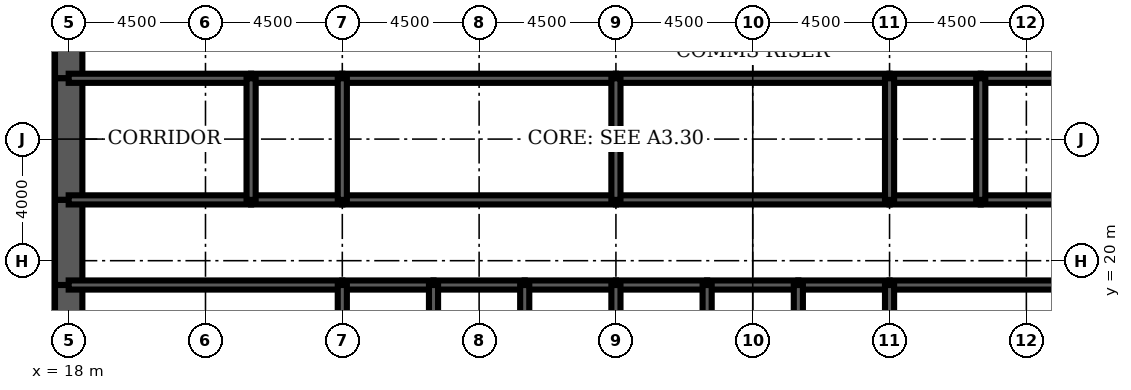
"""IFC4 building model, lengths in metres.
Left out: names, types, materials, properties, quantities, classifications, styles, units other than length and angle.
Written with IfcOpenShell. Run it as: python <this file> out.ifc"""

import sys

from ifc_helpers import new_model, si_unit, direction, frame, frame_2d, origin, place, context, subcontext, project, spatial, rectangle, extrude, element, fill, save


model = new_model("IFC4")
c1 = context("Model", 3, precision=1e-05, world=origin(), true_north=direction((0.0, 1.0)))
c2 = subcontext(c1, "Body", "Model", "MODEL_VIEW")
j1 = project(units=[si_unit("LENGTHUNIT", "METRE"), si_unit("PLANEANGLEUNIT", "RADIAN")], contexts=[c1])
p1 = place(None, origin())
s1 = spatial("IfcSite", under=j1, at=p1, CompositionType="ELEMENT")
p2 = place(p1, origin())
s2 = spatial("IfcBuilding", under=s1, at=p2, CompositionType="ELEMENT")
p3 = place(p2, frame((0.0, 0.0, 129.9)))
s3 = spatial("IfcBuildingStorey", under=s2, at=p3, CompositionType="ELEMENT", Elevation=129.9)
p4 = place(p3, frame((18.0, 28.8, 0.0), z_axis=(0.0, 0.0, 1.0), x_axis=(0.0, -1.0, 0.0)))
e1 = element("IfcWall", 1, at=p4, inside=s3, PredefinedType="SHEAR", context=c2, shape_type="SweptSolid", body=[
    extrude(rectangle(XDim=2.8, YDim=0.9, at=frame_2d((1.4, 0.0))), origin(), (0.0, 0.0, 1.0), 4.2),
])
p5 = place(p4, frame((0.4, 0.0, 0.0)))
e2 = element("IfcOpeningElement", 2, at=p5, cuts=e1, PredefinedType="OPENING", context=c2, shape_type="SweptSolid", body=[
    extrude(rectangle(XDim=1.8, YDim=2.1, at=frame_2d((0.9, 1.05))), frame((0.0, 0.46, 0.0), z_axis=(0.0, -1.0, 0.0), x_axis=(1.0, 0.0, 0.0)), (0.0, 0.0, 1.0), 0.92),
])
p6 = place(p3, frame((18.0, 26.0, 0.0), z_axis=(0.0, 0.0, 1.0), x_axis=(0.0, -1.0, 0.0)))
e3 = element("IfcWall", 3, at=p6, inside=s3, PredefinedType="SHEAR", context=c2, shape_type="SweptSolid", body=[
    extrude(rectangle(XDim=4.0, YDim=0.9, at=frame_2d((2.0, 0.0))), origin(), (0.0, 0.0, 1.0), 4.2),
])
p7 = place(p3, frame((18.0, 22.0, 0.0), z_axis=(0.0, 0.0, 1.0), x_axis=(0.0, -1.0, 0.0)))
e4 = element("IfcWall", 4, at=p7, inside=s3, PredefinedType="SHEAR", context=c2, shape_type="SweptSolid", body=[
    extrude(rectangle(XDim=2.8, YDim=0.9, at=frame_2d((1.4, 0.0))), origin(), (0.0, 0.0, 1.0), 4.2),
])
p8 = place(p7, frame((0.6, 0.0, 0.0)))
e5 = element("IfcOpeningElement", 5, at=p8, cuts=e4, PredefinedType="OPENING", context=c2, shape_type="SweptSolid", body=[
    extrude(rectangle(XDim=1.8, YDim=2.1, at=frame_2d((0.9, 1.05))), frame((0.0, 0.46, 0.0), z_axis=(0.0, -1.0, 0.0), x_axis=(1.0, 0.0, 0.0)), (0.0, 0.0, 1.0), 0.92),
])
p9 = place(p3, frame((18.0, 19.2, 0.0), z_axis=(0.0, 0.0, 1.0), x_axis=(0.0, -1.0, 0.0)))
e6 = element("IfcWall", 6, at=p9, inside=s3, PredefinedType="SHEAR", context=c2, shape_type="SweptSolid", body=[
    extrude(rectangle(XDim=3.2, YDim=0.9, at=frame_2d((1.6, 0.0))), origin(), (0.0, 0.0, 1.0), 4.2),
])
p10 = place(p3, frame((18.0, 19.2, 0.0), z_axis=(0.0, 0.0, 1.0), x_axis=(1.0, 0.0, 0.0)))
e7 = element("IfcWall", 7, at=p10, inside=s3, PredefinedType="SOLIDWALL", context=c2, shape_type="SweptSolid", body=[
    extrude(rectangle(XDim=9.0, YDim=0.3, at=frame_2d((4.5, 0.0))), origin(), (0.0, 0.0, 1.0), 4.2),
])
p11 = place(p10, frame((0.65, 0.0, 0.0)))
e8 = element("IfcOpeningElement", 8, at=p11, cuts=e7, PredefinedType="OPENING", context=c2, shape_type="SweptSolid", body=[
    extrude(rectangle(XDim=1.0, YDim=2.1, at=frame_2d((0.5, 1.05))), frame((0.0, 0.16, 0.0), z_axis=(0.0, -1.0, 0.0), x_axis=(1.0, 0.0, 0.0)), (0.0, 0.0, 1.0), 0.32),
])
p12 = place(p3, frame((27.0, 19.2, 0.0), z_axis=(0.0, 0.0, 1.0), x_axis=(1.0, 0.0, 0.0)))
e9 = element("IfcWall", 9, at=p12, inside=s3, PredefinedType="SOLIDWALL", context=c2, shape_type="SweptSolid", body=[
    extrude(rectangle(XDim=3.0, YDim=0.3, at=frame_2d((1.5, 0.0))), origin(), (0.0, 0.0, 1.0), 4.2),
])
p13 = place(p12, frame((0.95, 0.0, 0.0)))
e10 = element("IfcOpeningElement", 10, at=p13, cuts=e9, PredefinedType="OPENING", context=c2, shape_type="SweptSolid", body=[
    extrude(rectangle(XDim=1.1, YDim=2.2, at=frame_2d((0.55, 1.1))), frame((0.0, 0.16, 0.0), z_axis=(0.0, -1.0, 0.0), x_axis=(1.0, 0.0, 0.0)), (0.0, 0.0, 1.0), 0.32),
])
p14 = place(p3, frame((30.0, 19.2, 0.0), z_axis=(0.0, 0.0, 1.0), x_axis=(1.0, 0.0, 0.0)))
e11 = element("IfcWall", 11, at=p14, inside=s3, PredefinedType="SOLIDWALL", context=c2, shape_type="SweptSolid", body=[
    extrude(rectangle(XDim=3.0, YDim=0.3, at=frame_2d((1.5, 0.0))), origin(), (0.0, 0.0, 1.0), 4.2),
])
p15 = place(p14, frame((0.95, 0.0, 0.0)))
e12 = element("IfcOpeningElement", 12, at=p15, cuts=e11, PredefinedType="OPENING", context=c2, shape_type="SweptSolid", body=[
    extrude(rectangle(XDim=1.1, YDim=2.2, at=frame_2d((0.55, 1.1))), frame((0.0, 0.16, 0.0), z_axis=(0.0, -1.0, 0.0), x_axis=(1.0, 0.0, 0.0)), (0.0, 0.0, 1.0), 0.32),
])
p16 = place(p3, frame((33.0, 19.2, 0.0), z_axis=(0.0, 0.0, 1.0), x_axis=(1.0, 0.0, 0.0)))
e13 = element("IfcWall", 13, at=p16, inside=s3, PredefinedType="SOLIDWALL", context=c2, shape_type="SweptSolid", body=[
    extrude(rectangle(XDim=3.0, YDim=0.3, at=frame_2d((1.5, 0.0))), origin(), (0.0, 0.0, 1.0), 4.2),
])
p17 = place(p16, frame((0.95, 0.0, 0.0)))
e14 = element("IfcOpeningElement", 14, at=p17, cuts=e13, PredefinedType="OPENING", context=c2, shape_type="SweptSolid", body=[
    extrude(rectangle(XDim=1.1, YDim=2.2, at=frame_2d((0.55, 1.1))), frame((0.0, 0.16, 0.0), z_axis=(0.0, -1.0, 0.0), x_axis=(1.0, 0.0, 0.0)), (0.0, 0.0, 1.0), 0.32),
])
p18 = place(p3, frame((36.0, 19.2, 0.0), z_axis=(0.0, 0.0, 1.0), x_axis=(1.0, 0.0, 0.0)))
e15 = element("IfcWall", 15, at=p18, inside=s3, PredefinedType="SOLIDWALL", context=c2, shape_type="SweptSolid", body=[
    extrude(rectangle(XDim=3.0, YDim=0.3, at=frame_2d((1.5, 0.0))), origin(), (0.0, 0.0, 1.0), 4.2),
])
p19 = place(p18, frame((0.95, 0.0, 0.0)))
e16 = element("IfcOpeningElement", 16, at=p19, cuts=e15, PredefinedType="OPENING", context=c2, shape_type="SweptSolid", body=[
    extrude(rectangle(XDim=1.1, YDim=2.2, at=frame_2d((0.55, 1.1))), frame((0.0, 0.16, 0.0), z_axis=(0.0, -1.0, 0.0), x_axis=(1.0, 0.0, 0.0)), (0.0, 0.0, 1.0), 0.32),
])
p20 = place(p3, frame((39.0, 19.2, 0.0), z_axis=(0.0, 0.0, 1.0), x_axis=(1.0, 0.0, 0.0)))
e17 = element("IfcWall", 17, at=p20, inside=s3, PredefinedType="SOLIDWALL", context=c2, shape_type="SweptSolid", body=[
    extrude(rectangle(XDim=3.0, YDim=0.3, at=frame_2d((1.5, 0.0))), origin(), (0.0, 0.0, 1.0), 4.2),
])
p21 = place(p20, frame((1.0, 0.0, 0.0)))
e18 = element("IfcOpeningElement", 18, at=p21, cuts=e17, PredefinedType="OPENING", context=c2, shape_type="SweptSolid", body=[
    extrude(rectangle(XDim=1.0, YDim=2.1, at=frame_2d((0.5, 1.05))), frame((0.0, 0.16, 0.0), z_axis=(0.0, -1.0, 0.0), x_axis=(1.0, 0.0, 0.0)), (0.0, 0.0, 1.0), 0.32),
])
p22 = place(p3, frame((42.0, 19.2, 0.0), z_axis=(0.0, 0.0, 1.0), x_axis=(1.0, 0.0, 0.0)))
e19 = element("IfcWall", 19, at=p22, inside=s3, PredefinedType="SOLIDWALL", context=c2, shape_type="SweptSolid", body=[
    extrude(rectangle(XDim=3.0, YDim=0.3, at=frame_2d((1.5, 0.0))), origin(), (0.0, 0.0, 1.0), 4.2),
])
p23 = place(p3, frame((45.0, 19.2, 0.0), z_axis=(0.0, 0.0, 1.0), x_axis=(1.0, 0.0, 0.0)))
e20 = element("IfcWall", 20, at=p23, inside=s3, PredefinedType="SOLIDWALL", context=c2, shape_type="SweptSolid", body=[
    extrude(rectangle(XDim=9.0, YDim=0.3, at=frame_2d((4.5, 0.0))), origin(), (0.0, 0.0, 1.0), 4.2),
])
p24 = place(p23, frame((7.35, 0.0, 0.0)))
e21 = element("IfcOpeningElement", 21, at=p24, cuts=e20, PredefinedType="OPENING", context=c2, shape_type="SweptSolid", body=[
    extrude(rectangle(XDim=1.0, YDim=2.1, at=frame_2d((0.5, 1.05))), frame((0.0, 0.16, 0.0), z_axis=(0.0, -1.0, 0.0), x_axis=(1.0, 0.0, 0.0)), (0.0, 0.0, 1.0), 0.32),
])
p25 = place(p3, frame((18.0, 22.0, 0.0), z_axis=(0.0, 0.0, 1.0), x_axis=(1.0, 0.0, 0.0)))
e22 = element("IfcWall", 22, at=p25, inside=s3, PredefinedType="SOLIDWALL", context=c2, shape_type="SweptSolid", body=[
    extrude(rectangle(XDim=6.0, YDim=0.3, at=frame_2d((3.0, 0.0))), origin(), (0.0, 0.0, 1.0), 4.2),
])
p26 = place(p25, frame((2.0, 0.0, 0.0)))
e23 = element("IfcOpeningElement", 23, at=p26, cuts=e22, PredefinedType="OPENING", context=c2, shape_type="SweptSolid", body=[
    extrude(rectangle(XDim=1.0, YDim=2.1, at=frame_2d((0.5, 1.05))), frame((0.0, 0.16, 0.0), z_axis=(0.0, -1.0, 0.0), x_axis=(1.0, 0.0, 0.0)), (0.0, 0.0, 1.0), 0.32),
])
p27 = place(p3, frame((24.0, 22.0, 0.0), z_axis=(0.0, 0.0, 1.0), x_axis=(1.0, 0.0, 0.0)))
e24 = element("IfcWall", 24, at=p27, inside=s3, PredefinedType="SOLIDWALL", context=c2, shape_type="SweptSolid", body=[
    extrude(rectangle(XDim=3.0, YDim=0.3, at=frame_2d((1.5, 0.0))), origin(), (0.0, 0.0, 1.0), 4.2),
])
p28 = place(p27, frame((1.0, 0.0, 0.0)))
e25 = element("IfcOpeningElement", 25, at=p28, cuts=e24, PredefinedType="OPENING", context=c2, shape_type="SweptSolid", body=[
    extrude(rectangle(XDim=1.0, YDim=2.1, at=frame_2d((0.5, 1.05))), frame((0.0, 0.16, 0.0), z_axis=(0.0, -1.0, 0.0), x_axis=(1.0, 0.0, 0.0)), (0.0, 0.0, 1.0), 0.32),
])
p29 = place(p3, frame((27.0, 22.0, 0.0), z_axis=(0.0, 0.0, 1.0), x_axis=(1.0, 0.0, 0.0)))
e26 = element("IfcWall", 26, at=p29, inside=s3, PredefinedType="SOLIDWALL", context=c2, shape_type="SweptSolid", body=[
    extrude(rectangle(XDim=9.0, YDim=0.3, at=frame_2d((4.5, 0.0))), origin(), (0.0, 0.0, 1.0), 4.2),
])
p30 = place(p29, frame((4.0, 0.0, 0.0)))
e27 = element("IfcOpeningElement", 27, at=p30, cuts=e26, PredefinedType="OPENING", context=c2, shape_type="SweptSolid", body=[
    extrude(rectangle(XDim=1.0, YDim=2.1, at=frame_2d((0.5, 1.05))), frame((0.0, 0.16, 0.0), z_axis=(0.0, -1.0, 0.0), x_axis=(1.0, 0.0, 0.0)), (0.0, 0.0, 1.0), 0.32),
])
p31 = place(p3, frame((36.0, 22.0, 0.0), z_axis=(0.0, 0.0, 1.0), x_axis=(1.0, 0.0, 0.0)))
e28 = element("IfcWall", 28, at=p31, inside=s3, PredefinedType="SOLIDWALL", context=c2, shape_type="SweptSolid", body=[
    extrude(rectangle(XDim=9.0, YDim=0.3, at=frame_2d((4.5, 0.0))), origin(), (0.0, 0.0, 1.0), 4.2),
])
p32 = place(p31, frame((4.0, 0.0, 0.0)))
e29 = element("IfcOpeningElement", 29, at=p32, cuts=e28, PredefinedType="OPENING", context=c2, shape_type="SweptSolid", body=[
    extrude(rectangle(XDim=1.0, YDim=2.1, at=frame_2d((0.5, 1.05))), frame((0.0, 0.16, 0.0), z_axis=(0.0, -1.0, 0.0), x_axis=(1.0, 0.0, 0.0)), (0.0, 0.0, 1.0), 0.32),
])
p33 = place(p3, frame((45.0, 22.0, 0.0), z_axis=(0.0, 0.0, 1.0), x_axis=(1.0, 0.0, 0.0)))
e30 = element("IfcWall", 30, at=p33, inside=s3, PredefinedType="SOLIDWALL", context=c2, shape_type="SweptSolid", body=[
    extrude(rectangle(XDim=3.0, YDim=0.3, at=frame_2d((1.5, 0.0))), origin(), (0.0, 0.0, 1.0), 4.2),
])
p34 = place(p33, frame((1.0, 0.0, 0.0)))
e31 = element("IfcOpeningElement", 31, at=p34, cuts=e30, PredefinedType="OPENING", context=c2, shape_type="SweptSolid", body=[
    extrude(rectangle(XDim=1.0, YDim=2.1, at=frame_2d((0.5, 1.05))), frame((0.0, 0.16, 0.0), z_axis=(0.0, -1.0, 0.0), x_axis=(1.0, 0.0, 0.0)), (0.0, 0.0, 1.0), 0.32),
])
p35 = place(p3, frame((48.0, 22.0, 0.0), z_axis=(0.0, 0.0, 1.0), x_axis=(1.0, 0.0, 0.0)))
e32 = element("IfcWall", 32, at=p35, inside=s3, PredefinedType="SOLIDWALL", context=c2, shape_type="SweptSolid", body=[
    extrude(rectangle(XDim=6.0, YDim=0.3, at=frame_2d((3.0, 0.0))), origin(), (0.0, 0.0, 1.0), 4.2),
])
p36 = place(p35, frame((2.0, 0.0, 0.0)))
e33 = element("IfcOpeningElement", 33, at=p36, cuts=e32, PredefinedType="OPENING", context=c2, shape_type="SweptSolid", body=[
    extrude(rectangle(XDim=1.0, YDim=2.1, at=frame_2d((0.5, 1.05))), frame((0.0, 0.16, 0.0), z_axis=(0.0, -1.0, 0.0), x_axis=(1.0, 0.0, 0.0)), (0.0, 0.0, 1.0), 0.32),
])
p37 = place(p35, frame((4.15, 0.0, 0.0)))
e34 = element("IfcOpeningElement", 34, at=p37, cuts=e32, PredefinedType="OPENING", context=c2, shape_type="SweptSolid", body=[
    extrude(rectangle(XDim=1.0, YDim=2.1, at=frame_2d((0.5, 1.05))), frame((0.0, 0.16, 0.0), z_axis=(0.0, -1.0, 0.0), x_axis=(1.0, 0.0, 0.0)), (0.0, 0.0, 1.0), 0.32),
])
p38 = place(p3, frame((18.0, 26.0, 0.0), z_axis=(0.0, 0.0, 1.0), x_axis=(1.0, 0.0, 0.0)))
e35 = element("IfcWall", 35, at=p38, inside=s3, PredefinedType="SOLIDWALL", context=c2, shape_type="SweptSolid", body=[
    extrude(rectangle(XDim=6.0, YDim=0.3, at=frame_2d((3.0, 0.0))), origin(), (0.0, 0.0, 1.0), 4.2),
])
p39 = place(p3, frame((24.0, 26.0, 0.0), z_axis=(0.0, 0.0, 1.0), x_axis=(1.0, 0.0, 0.0)))
e36 = element("IfcWall", 36, at=p39, inside=s3, PredefinedType="SOLIDWALL", context=c2, shape_type="SweptSolid", body=[
    extrude(rectangle(XDim=3.0, YDim=0.3, at=frame_2d((1.5, 0.0))), origin(), (0.0, 0.0, 1.0), 4.2),
])
for number, where, z_axis, x_axis in (
    (37, (27.0, 26.0, 0.0), (0.0, 0.0, 1.0), (1.0, 0.0, 0.0)),
    (38, (36.0, 26.0, 0.0), (0.0, 0.0, 1.0), (1.0, 0.0, 0.0)),
):
    element("IfcWall", number, at=place(p3, frame(where, z_axis=z_axis, x_axis=x_axis)), inside=s3, PredefinedType="SOLIDWALL", context=c2, shape_type="SweptSolid", body=[
        extrude(rectangle(XDim=9.0, YDim=0.3, at=frame_2d((4.5, 0.0))), origin(), (0.0, 0.0, 1.0), 4.2),
    ])
p40 = place(p3, frame((45.0, 26.0, 0.0), z_axis=(0.0, 0.0, 1.0), x_axis=(1.0, 0.0, 0.0)))
e39 = element("IfcWall", 39, at=p40, inside=s3, PredefinedType="SOLIDWALL", context=c2, shape_type="SweptSolid", body=[
    extrude(rectangle(XDim=3.0, YDim=0.3, at=frame_2d((1.5, 0.0))), origin(), (0.0, 0.0, 1.0), 4.2),
])
p41 = place(p3, frame((48.0, 26.0, 0.0), z_axis=(0.0, 0.0, 1.0), x_axis=(1.0, 0.0, 0.0)))
e40 = element("IfcWall", 40, at=p41, inside=s3, PredefinedType="SOLIDWALL", context=c2, shape_type="SweptSolid", body=[
    extrude(rectangle(XDim=6.0, YDim=0.3, at=frame_2d((3.0, 0.0))), origin(), (0.0, 0.0, 1.0), 4.2),
])
for number, where, z_axis, x_axis in (
    (41, (27.0, 16.0, 0.0), (0.0, 0.0, 1.0), (0.0, 1.0, 0.0)),
    (42, (30.0, 16.0, 0.0), (0.0, 0.0, 1.0), (0.0, 1.0, 0.0)),
    (43, (33.0, 16.0, 0.0), (0.0, 0.0, 1.0), (0.0, 1.0, 0.0)),
    (44, (36.0, 16.0, 0.0), (0.0, 0.0, 1.0), (0.0, 1.0, 0.0)),
    (45, (39.0, 16.0, 0.0), (0.0, 0.0, 1.0), (0.0, 1.0, 0.0)),
    (46, (42.0, 16.0, 0.0), (0.0, 0.0, 1.0), (0.0, 1.0, 0.0)),
    (47, (45.0, 16.0, 0.0), (0.0, 0.0, 1.0), (0.0, 1.0, 0.0)),
):
    element("IfcWall", number, at=place(p3, frame(where, z_axis=z_axis, x_axis=x_axis)), inside=s3, PredefinedType="SOLIDWALL", context=c2, shape_type="SweptSolid", body=[
        extrude(rectangle(XDim=3.2, YDim=0.3, at=frame_2d((1.6, 0.0))), origin(), (0.0, 0.0, 1.0), 4.2),
    ])
for number, where, z_axis, x_axis in (
    (48, (24.0, 22.0, 0.0), (0.0, 0.0, 1.0), (0.0, 1.0, 0.0)),
    (49, (27.0, 22.0, 0.0), (0.0, 0.0, 1.0), (0.0, 1.0, 0.0)),
    (50, (36.0, 22.0, 0.0), (0.0, 0.0, 1.0), (0.0, 1.0, 0.0)),
    (51, (45.0, 22.0, 0.0), (0.0, 0.0, 1.0), (0.0, 1.0, 0.0)),
    (52, (48.0, 22.0, 0.0), (0.0, 0.0, 1.0), (0.0, 1.0, 0.0)),
):
    element("IfcWall", number, at=place(p3, frame(where, z_axis=z_axis, x_axis=x_axis)), inside=s3, PredefinedType="SOLIDWALL", context=c2, shape_type="SweptSolid", body=[
        extrude(rectangle(XDim=4.0, YDim=0.3, at=frame_2d((2.0, 0.0))), origin(), (0.0, 0.0, 1.0), 4.2),
    ])
p42 = place(p3, frame((38.0, 22.15, 0.0), z_axis=(0.0, 0.0, 1.0), x_axis=(0.0, 1.0, 0.0)))
e53 = element("IfcWall", 53, at=p42, inside=s3, PredefinedType="PARTITIONING", context=c2, shape_type="SweptSolid", body=[
    extrude(rectangle(XDim=3.7, YDim=0.15, at=frame_2d((1.85, 0.0))), origin(), (0.0, 0.0, 1.0), 3.0),
])
p43 = place(p42, frame((2.2, 0.0, 0.0)))
e54 = element("IfcOpeningElement", 54, at=p43, cuts=e53, PredefinedType="OPENING", context=c2, shape_type="SweptSolid", body=[
    extrude(rectangle(XDim=1.0, YDim=2.1, at=frame_2d((0.5, 1.05))), frame((0.0, 0.085, 0.0), z_axis=(0.0, -1.0, 0.0), x_axis=(1.0, 0.0, 0.0)), (0.0, 0.0, 1.0), 0.17),
])
p44 = place(p3, frame((49.4, 19.35, 0.0), z_axis=(0.0, 0.0, 1.0), x_axis=(0.0, 1.0, 0.0)))
e55 = element("IfcWall", 55, at=p44, inside=s3, PredefinedType="PARTITIONING", context=c2, shape_type="SweptSolid", body=[
    extrude(rectangle(XDim=2.5, YDim=0.15, at=frame_2d((1.25, 0.0))), origin(), (0.0, 0.0, 1.0), 3.0),
])
p45 = place(p44, frame((1.15, 0.0, 0.0)))
e56 = element("IfcOpeningElement", 56, at=p45, cuts=e55, PredefinedType="OPENING", context=c2, shape_type="SweptSolid", body=[
    extrude(rectangle(XDim=1.0, YDim=2.1, at=frame_2d((0.5, 1.05))), frame((0.0, 0.085, 0.0), z_axis=(0.0, -1.0, 0.0), x_axis=(1.0, 0.0, 0.0)), (0.0, 0.0, 1.0), 0.17),
])
p46 = place(p43, origin())
e57 = element("IfcDoor", 57, at=p46, inside=s3, OperationType="SINGLE_SWING_RIGHT", PredefinedType="DOOR", context=c2, shape_type="SweptSolid", body=[
    extrude(rectangle(XDim=1.0, YDim=2.1, at=frame_2d((0.5, 1.05))), frame((0.0, 0.025, 0.0), z_axis=(0.0, -1.0, 0.0), x_axis=(1.0, 0.0, 0.0)), (0.0, 0.0, 1.0), 0.05),
])
fill(e54, e57)
p47 = place(p45, origin())
e58 = element("IfcDoor", 58, at=p47, inside=s3, OperationType="SINGLE_SWING_RIGHT", PredefinedType="DOOR", context=c2, shape_type="SweptSolid", body=[
    extrude(rectangle(XDim=1.0, YDim=2.1, at=frame_2d((0.5, 1.05))), frame((0.0, 0.025, 0.0), z_axis=(0.0, -1.0, 0.0), x_axis=(1.0, 0.0, 0.0)), (0.0, 0.0, 1.0), 0.05),
])
fill(e56, e58)
p48 = place(p13, origin())
e59 = element("IfcDoor", 59, at=p48, inside=s3, OperationType="DOUBLE_DOOR_SLIDING", PredefinedType="USERDEFINED", context=c2, shape_type="SweptSolid", body=[
    extrude(rectangle(XDim=1.1, YDim=2.2, at=frame_2d((0.55, 1.1))), frame((0.0, 0.025, 0.0), z_axis=(0.0, -1.0, 0.0), x_axis=(1.0, 0.0, 0.0)), (0.0, 0.0, 1.0), 0.05),
])
fill(e10, e59)
p49 = place(p15, origin())
e60 = element("IfcDoor", 60, at=p49, inside=s3, OperationType="DOUBLE_DOOR_SLIDING", PredefinedType="USERDEFINED", context=c2, shape_type="SweptSolid", body=[
    extrude(rectangle(XDim=1.1, YDim=2.2, at=frame_2d((0.55, 1.1))), frame((0.0, 0.025, 0.0), z_axis=(0.0, -1.0, 0.0), x_axis=(1.0, 0.0, 0.0)), (0.0, 0.0, 1.0), 0.05),
])
fill(e12, e60)
p50 = place(p17, origin())
e61 = element("IfcDoor", 61, at=p50, inside=s3, OperationType="DOUBLE_DOOR_SLIDING", PredefinedType="USERDEFINED", context=c2, shape_type="SweptSolid", body=[
    extrude(rectangle(XDim=1.1, YDim=2.2, at=frame_2d((0.55, 1.1))), frame((0.0, 0.025, 0.0), z_axis=(0.0, -1.0, 0.0), x_axis=(1.0, 0.0, 0.0)), (0.0, 0.0, 1.0), 0.05),
])
fill(e14, e61)
p51 = place(p19, origin())
e62 = element("IfcDoor", 62, at=p51, inside=s3, OperationType="DOUBLE_DOOR_SLIDING", PredefinedType="USERDEFINED", context=c2, shape_type="SweptSolid", body=[
    extrude(rectangle(XDim=1.1, YDim=2.2, at=frame_2d((0.55, 1.1))), frame((0.0, 0.025, 0.0), z_axis=(0.0, -1.0, 0.0), x_axis=(1.0, 0.0, 0.0)), (0.0, 0.0, 1.0), 0.05),
])
fill(e16, e62)
p52 = place(p11, origin())
e63 = element("IfcDoor", 63, at=p52, inside=s3, OperationType="SINGLE_SWING_LEFT", PredefinedType="DOOR", context=c2, shape_type="SweptSolid", body=[
    extrude(rectangle(XDim=1.0, YDim=2.1, at=frame_2d((0.5, 1.05))), frame((0.0, 0.025, 0.0), z_axis=(0.0, -1.0, 0.0), x_axis=(1.0, 0.0, 0.0)), (0.0, 0.0, 1.0), 0.05),
])
fill(e8, e63)
p53 = place(p8, origin())
e64 = element("IfcDoor", 64, at=p53, inside=s3, OperationType="SINGLE_SWING_LEFT", PredefinedType="DOOR", context=c2, shape_type="SweptSolid", body=[
    extrude(rectangle(XDim=1.8, YDim=2.1, at=frame_2d((0.9, 1.05))), frame((0.0, 0.45, 0.0), z_axis=(0.0, -1.0, 0.0), x_axis=(1.0, 0.0, 0.0)), (0.0, 0.0, 1.0), 0.899),
])
fill(e5, e64)
p54 = place(p5, origin())
e65 = element("IfcDoor", 65, at=p54, inside=s3, OperationType="SINGLE_SWING_LEFT", PredefinedType="DOOR", context=c2, shape_type="SweptSolid", body=[
    extrude(rectangle(XDim=1.8, YDim=2.1, at=frame_2d((0.9, 1.05))), frame((0.0, 0.45, 0.0), z_axis=(0.0, -1.0, 0.0), x_axis=(1.0, 0.0, 0.0)), (0.0, 0.0, 1.0), 0.899),
])
fill(e2, e65)
p55 = place(p26, origin())
e66 = element("IfcDoor", 66, at=p55, inside=s3, OperationType="SINGLE_SWING_LEFT", PredefinedType="DOOR", context=c2, shape_type="SweptSolid", body=[
    extrude(rectangle(XDim=1.0, YDim=2.1, at=frame_2d((0.5, 1.05))), frame((0.0, 0.025, 0.0), z_axis=(0.0, -1.0, 0.0), x_axis=(1.0, 0.0, 0.0)), (0.0, 0.0, 1.0), 0.05),
])
fill(e23, e66)
p56 = place(p28, origin())
e67 = element("IfcDoor", 67, at=p56, inside=s3, OperationType="SINGLE_SWING_LEFT", PredefinedType="DOOR", context=c2, shape_type="SweptSolid", body=[
    extrude(rectangle(XDim=1.0, YDim=2.1, at=frame_2d((0.5, 1.05))), frame((0.0, 0.025, 0.0), z_axis=(0.0, -1.0, 0.0), x_axis=(1.0, 0.0, 0.0)), (0.0, 0.0, 1.0), 0.05),
])
fill(e25, e67)
p57 = place(p30, origin())
e68 = element("IfcDoor", 68, at=p57, inside=s3, OperationType="SINGLE_SWING_LEFT", PredefinedType="DOOR", context=c2, shape_type="SweptSolid", body=[
    extrude(rectangle(XDim=1.0, YDim=2.1, at=frame_2d((0.5, 1.05))), frame((0.0, 0.025, 0.0), z_axis=(0.0, -1.0, 0.0), x_axis=(1.0, 0.0, 0.0)), (0.0, 0.0, 1.0), 0.05),
])
fill(e27, e68)
p58 = place(p32, origin())
e69 = element("IfcDoor", 69, at=p58, inside=s3, OperationType="SINGLE_SWING_LEFT", PredefinedType="DOOR", context=c2, shape_type="SweptSolid", body=[
    extrude(rectangle(XDim=1.0, YDim=2.1, at=frame_2d((0.5, 1.05))), frame((0.0, 0.025, 0.0), z_axis=(0.0, -1.0, 0.0), x_axis=(1.0, 0.0, 0.0)), (0.0, 0.0, 1.0), 0.05),
])
fill(e29, e69)
p59 = place(p34, origin())
e70 = element("IfcDoor", 70, at=p59, inside=s3, OperationType="SINGLE_SWING_LEFT", PredefinedType="DOOR", context=c2, shape_type="SweptSolid", body=[
    extrude(rectangle(XDim=1.0, YDim=2.1, at=frame_2d((0.5, 1.05))), frame((0.0, 0.025, 0.0), z_axis=(0.0, -1.0, 0.0), x_axis=(1.0, 0.0, 0.0)), (0.0, 0.0, 1.0), 0.05),
])
fill(e31, e70)
p60 = place(p36, origin())
e71 = element("IfcDoor", 71, at=p60, inside=s3, OperationType="SINGLE_SWING_LEFT", PredefinedType="DOOR", context=c2, shape_type="SweptSolid", body=[
    extrude(rectangle(XDim=1.0, YDim=2.1, at=frame_2d((0.5, 1.05))), frame((0.0, 0.025, 0.0), z_axis=(0.0, -1.0, 0.0), x_axis=(1.0, 0.0, 0.0)), (0.0, 0.0, 1.0), 0.05),
])
fill(e33, e71)
p61 = place(p21, origin())
e72 = element("IfcDoor", 72, at=p61, inside=s3, OperationType="SINGLE_SWING_LEFT", PredefinedType="DOOR", context=c2, shape_type="SweptSolid", body=[
    extrude(rectangle(XDim=1.0, YDim=2.1, at=frame_2d((0.5, 1.05))), frame((0.0, 0.025, 0.0), z_axis=(0.0, -1.0, 0.0), x_axis=(1.0, 0.0, 0.0)), (0.0, 0.0, 1.0), 0.05),
])
fill(e18, e72)
save(model, sys.argv[1])
